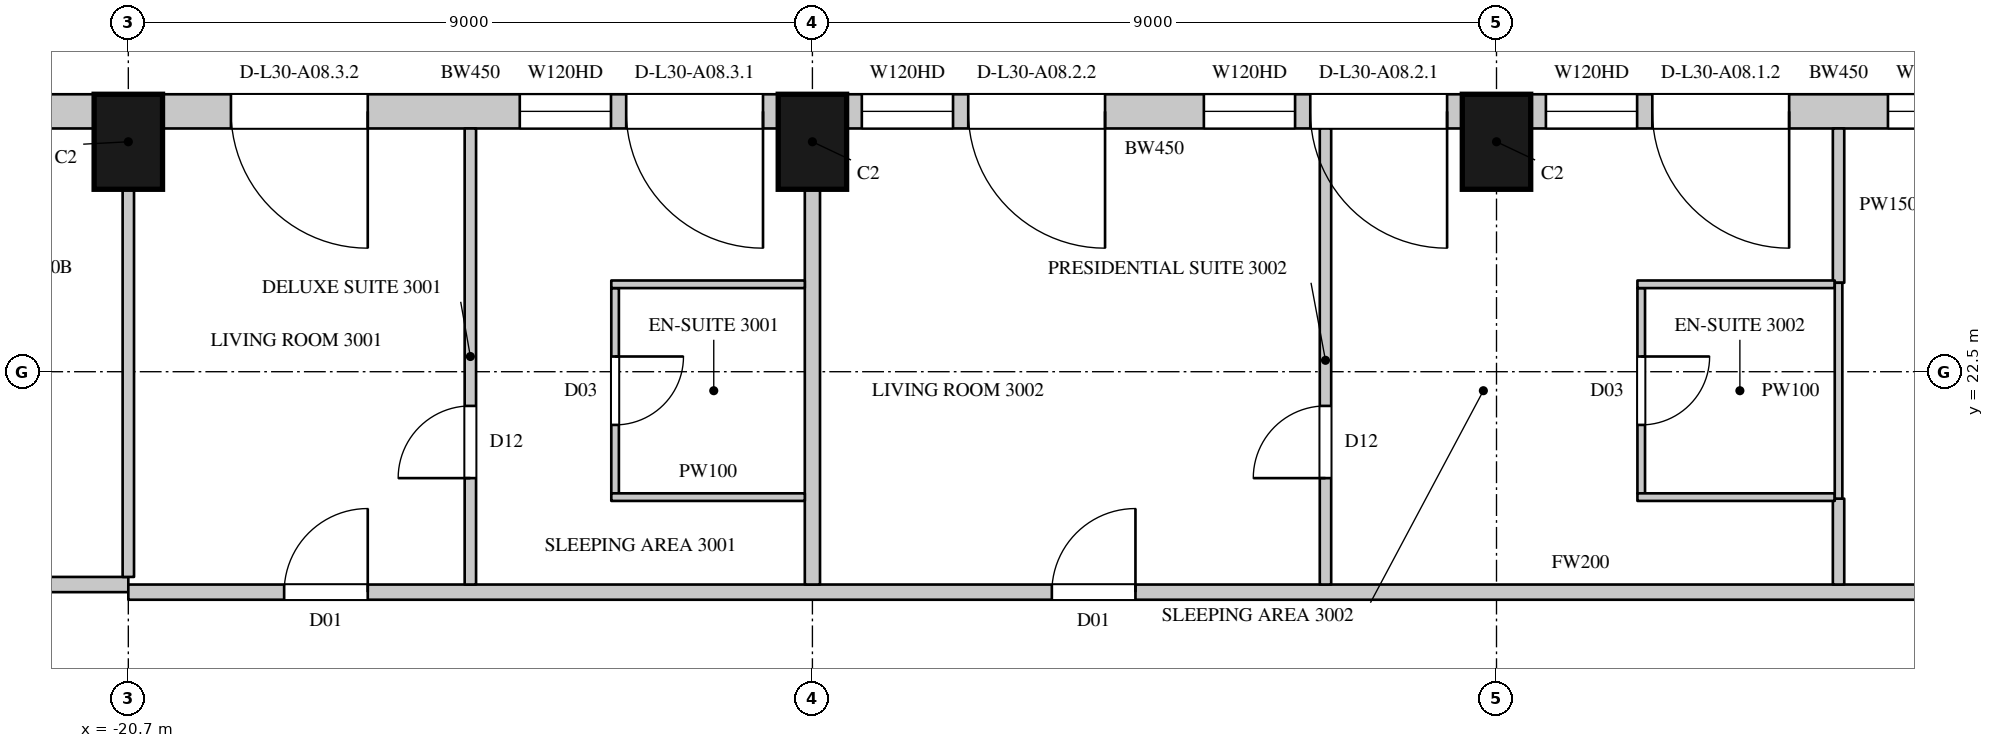
"""IFC4 building model, lengths in metres.
Left out: names, types, materials, properties, quantities, classifications, styles, units other than length and angle.
Written with IfcOpenShell. Run it as: python <this file> out.ifc"""

import sys

from ifc_helpers import new_model, si_unit, direction, frame, frame_2d, origin, origin_2d, place, context, subcontext, project, spatial, rectangle, extrude, element, fill, save


model = new_model("IFC4")
c1 = context("Model", 3, precision=1e-05, world=origin(), true_north=direction((0.0, 1.0)))
c2 = subcontext(c1, "Body", "Model", "MODEL_VIEW")
j1 = project(units=[si_unit("LENGTHUNIT", "METRE"), si_unit("PLANEANGLEUNIT", "RADIAN")], contexts=[c1])
p1 = place(None, origin())
s1 = spatial("IfcSite", under=j1, at=p1, CompositionType="ELEMENT")
p2 = place(p1, origin())
s2 = spatial("IfcBuilding", under=s1, at=p2, CompositionType="ELEMENT")
p3 = place(p2, frame((0.0, 0.0, 138.3)))
s3 = spatial("IfcBuildingStorey", under=s2, at=p3, CompositionType="ELEMENT", Elevation=138.3)
for number, where, z_axis, x_axis in (
    (1, (-2.7, 25.525, 0.0), (0.0, 0.0, 1.0), (-1.0, 0.0, 0.0)),
    (2, (-11.7, 25.525, 0.0), (0.0, 0.0, 1.0), (-1.0, 0.0, 0.0)),
    (3, (-20.7, 25.525, 0.0), (0.0, 0.0, 1.0), (-1.0, 0.0, 0.0)),
):
    element("IfcColumn", number, at=place(p3, frame(where, z_axis=z_axis, x_axis=x_axis)), inside=s3, PredefinedType="COLUMN", context=c2, shape_type="SweptSolid", body=[
        extrude(rectangle(XDim=0.9, YDim=1.25, at=origin_2d()), origin(), (0.0, 0.0, 1.0), 3.6),
    ])
p4 = place(p3, frame((5.85, 25.925, 0.0), z_axis=(0.0, 0.0, 1.0), x_axis=(-1.0, 0.0, 0.0)))
e4 = element("IfcWall", 4, at=p4, inside=s3, PredefinedType="SOLIDWALL", context=c2, shape_type="SweptSolid", body=[
    extrude(rectangle(XDim=8.1, YDim=0.45, at=frame_2d((4.05, 0.0))), origin(), (0.0, 0.0, 1.0), 3.3),
])
p5 = place(p4, frame((0.2, 0.0, 0.0)))
e5 = element("IfcOpeningElement", 5, at=p5, cuts=e4, PredefinedType="OPENING", context=c2, shape_type="SweptSolid", body=[
    extrude(rectangle(XDim=1.8, YDim=2.4, at=frame_2d((0.9, 1.2))), frame((0.0, 0.235, 0.0), z_axis=(0.0, -1.0, 0.0), x_axis=(1.0, 0.0, 0.0)), (0.0, 0.0, 1.0), 0.47),
])
p6 = place(p4, frame((2.2, 0.0, 1.05)))
e6 = element("IfcOpeningElement", 6, at=p6, cuts=e4, PredefinedType="OPENING", context=c2, shape_type="SweptSolid", body=[
    extrude(rectangle(XDim=1.2, YDim=2.0, at=frame_2d((0.6, 1.0))), frame((0.0, 0.235, 0.0), z_axis=(0.0, -1.0, 0.0), x_axis=(1.0, 0.0, 0.0)), (0.0, 0.0, 1.0), 0.47),
])
p7 = place(p4, frame((4.7, 0.0, 0.0)))
e7 = element("IfcOpeningElement", 7, at=p7, cuts=e4, PredefinedType="OPENING", context=c2, shape_type="SweptSolid", body=[
    extrude(rectangle(XDim=1.8, YDim=2.4, at=frame_2d((0.9, 1.2))), frame((0.0, 0.235, 0.0), z_axis=(0.0, -1.0, 0.0), x_axis=(1.0, 0.0, 0.0)), (0.0, 0.0, 1.0), 0.47),
])
p8 = place(p4, frame((6.7, 0.0, 1.05)))
e8 = element("IfcOpeningElement", 8, at=p8, cuts=e4, PredefinedType="OPENING", context=c2, shape_type="SweptSolid", body=[
    extrude(rectangle(XDim=1.2, YDim=2.0, at=frame_2d((0.6, 1.0))), frame((0.0, 0.235, 0.0), z_axis=(0.0, -1.0, 0.0), x_axis=(1.0, 0.0, 0.0)), (0.0, 0.0, 1.0), 0.47),
])
p9 = place(p3, frame((-3.15, 25.925, 0.0), z_axis=(0.0, 0.0, 1.0), x_axis=(-1.0, 0.0, 0.0)))
e9 = element("IfcWall", 9, at=p9, inside=s3, PredefinedType="SOLIDWALL", context=c2, shape_type="SweptSolid", body=[
    extrude(rectangle(XDim=8.1, YDim=0.45, at=frame_2d((4.05, 0.0))), origin(), (0.0, 0.0, 1.0), 3.3),
])
p10 = place(p9, frame((0.2, 0.0, 0.0)))
e10 = element("IfcOpeningElement", 10, at=p10, cuts=e9, PredefinedType="OPENING", context=c2, shape_type="SweptSolid", body=[
    extrude(rectangle(XDim=1.8, YDim=2.4, at=frame_2d((0.9, 1.2))), frame((0.0, 0.235, 0.0), z_axis=(0.0, -1.0, 0.0), x_axis=(1.0, 0.0, 0.0)), (0.0, 0.0, 1.0), 0.47),
])
p11 = place(p9, frame((2.2, 0.0, 1.05)))
e11 = element("IfcOpeningElement", 11, at=p11, cuts=e9, PredefinedType="OPENING", context=c2, shape_type="SweptSolid", body=[
    extrude(rectangle(XDim=1.2, YDim=2.0, at=frame_2d((0.6, 1.0))), frame((0.0, 0.235, 0.0), z_axis=(0.0, -1.0, 0.0), x_axis=(1.0, 0.0, 0.0)), (0.0, 0.0, 1.0), 0.47),
])
p12 = place(p9, frame((4.7, 0.0, 0.0)))
e12 = element("IfcOpeningElement", 12, at=p12, cuts=e9, PredefinedType="OPENING", context=c2, shape_type="SweptSolid", body=[
    extrude(rectangle(XDim=1.8, YDim=2.4, at=frame_2d((0.9, 1.2))), frame((0.0, 0.235, 0.0), z_axis=(0.0, -1.0, 0.0), x_axis=(1.0, 0.0, 0.0)), (0.0, 0.0, 1.0), 0.47),
])
p13 = place(p9, frame((6.7, 0.0, 1.05)))
e13 = element("IfcOpeningElement", 13, at=p13, cuts=e9, PredefinedType="OPENING", context=c2, shape_type="SweptSolid", body=[
    extrude(rectangle(XDim=1.2, YDim=2.0, at=frame_2d((0.6, 1.0))), frame((0.0, 0.235, 0.0), z_axis=(0.0, -1.0, 0.0), x_axis=(1.0, 0.0, 0.0)), (0.0, 0.0, 1.0), 0.47),
])
p14 = place(p3, frame((-12.15, 25.925, 0.0), z_axis=(0.0, 0.0, 1.0), x_axis=(-1.0, 0.0, 0.0)))
e14 = element("IfcWall", 14, at=p14, inside=s3, PredefinedType="SOLIDWALL", context=c2, shape_type="SweptSolid", body=[
    extrude(rectangle(XDim=8.1, YDim=0.45, at=frame_2d((4.05, 0.0))), origin(), (0.0, 0.0, 1.0), 3.3),
])
p15 = place(p14, frame((0.2, 0.0, 0.0)))
e15 = element("IfcOpeningElement", 15, at=p15, cuts=e14, PredefinedType="OPENING", context=c2, shape_type="SweptSolid", body=[
    extrude(rectangle(XDim=1.8, YDim=2.4, at=frame_2d((0.9, 1.2))), frame((0.0, 0.235, 0.0), z_axis=(0.0, -1.0, 0.0), x_axis=(1.0, 0.0, 0.0)), (0.0, 0.0, 1.0), 0.47),
])
p16 = place(p14, frame((2.2, 0.0, 1.05)))
e16 = element("IfcOpeningElement", 16, at=p16, cuts=e14, PredefinedType="OPENING", context=c2, shape_type="SweptSolid", body=[
    extrude(rectangle(XDim=1.2, YDim=2.0, at=frame_2d((0.6, 1.0))), frame((0.0, 0.235, 0.0), z_axis=(0.0, -1.0, 0.0), x_axis=(1.0, 0.0, 0.0)), (0.0, 0.0, 1.0), 0.47),
])
p17 = place(p14, frame((5.4, 0.0, 0.0)))
e17 = element("IfcOpeningElement", 17, at=p17, cuts=e14, PredefinedType="OPENING", context=c2, shape_type="SweptSolid", body=[
    extrude(rectangle(XDim=1.8, YDim=2.4, at=frame_2d((0.9, 1.2))), frame((0.0, 0.235, 0.0), z_axis=(0.0, -1.0, 0.0), x_axis=(1.0, 0.0, 0.0)), (0.0, 0.0, 1.0), 0.47),
])
p18 = place(p3, frame((-21.15, 25.925, 0.0), z_axis=(0.0, 0.0, 1.0), x_axis=(-1.0, 0.0, 0.0)))
e18 = element("IfcWall", 18, at=p18, inside=s3, PredefinedType="SOLIDWALL", context=c2, shape_type="SweptSolid", body=[
    extrude(rectangle(XDim=2.914, YDim=0.45, at=frame_2d((1.457, 0.0))), origin(), (0.0, 0.0, 1.0), 3.3),
])
p19 = place(p3, frame((-23.752, 19.7, 0.0), z_axis=(0.0, 0.0, 1.0), x_axis=(1.0, 0.0, 0.0)))
e19 = element("IfcWall", 19, at=p19, inside=s3, PredefinedType="PARTITIONING", context=c2, shape_type="SweptSolid", body=[
    extrude(rectangle(XDim=3.052, YDim=0.2, at=frame_2d((1.526, 0.0))), origin(), (0.0, 0.0, 1.0), 3.3),
])
p20 = place(p19, frame((0.85, 0.0, 0.0)))
e20 = element("IfcOpeningElement", 20, at=p20, cuts=e19, PredefinedType="OPENING", context=c2, shape_type="SweptSolid", body=[
    extrude(rectangle(XDim=0.9, YDim=2.2, at=frame_2d((0.45, 1.1))), frame((0.0, 0.11, 0.0), z_axis=(0.0, -1.0, 0.0), x_axis=(1.0, 0.0, 0.0)), (0.0, 0.0, 1.0), 0.22),
])
p21 = place(p3, frame((-20.7, 19.6, 0.0), z_axis=(0.0, 0.0, 1.0), x_axis=(1.0, 0.0, 0.0)))
e21 = element("IfcWall", 21, at=p21, inside=s3, PredefinedType="PARTITIONING", context=c2, shape_type="SweptSolid", body=[
    extrude(rectangle(XDim=38.214, YDim=0.2, at=frame_2d((19.107, 0.0))), origin(), (0.0, 0.0, 1.0), 3.3),
])
p22 = place(p21, frame((23.95, 0.0, 0.0)))
e22 = element("IfcOpeningElement", 22, at=p22, cuts=e21, PredefinedType="OPENING", context=c2, shape_type="SweptSolid", body=[
    extrude(rectangle(XDim=0.9, YDim=2.2, at=frame_2d((0.45, 1.1))), frame((0.0, 0.11, 0.0), z_axis=(0.0, -1.0, 0.0), x_axis=(1.0, 0.0, 0.0)), (0.0, 0.0, 1.0), 0.22),
])
p23 = place(p21, frame((2.05, 0.0, 0.0)))
e23 = element("IfcOpeningElement", 23, at=p23, cuts=e21, PredefinedType="OPENING", context=c2, shape_type="SweptSolid", body=[
    extrude(rectangle(XDim=1.1, YDim=2.4, at=frame_2d((0.55, 1.2))), frame((0.0, 0.11, 0.0), z_axis=(0.0, -1.0, 0.0), x_axis=(1.0, 0.0, 0.0)), (0.0, 0.0, 1.0), 0.22),
])
p24 = place(p21, frame((12.15, 0.0, 0.0)))
e24 = element("IfcOpeningElement", 24, at=p24, cuts=e21, PredefinedType="OPENING", context=c2, shape_type="SweptSolid", body=[
    extrude(rectangle(XDim=1.1, YDim=2.4, at=frame_2d((0.55, 1.2))), frame((0.0, 0.11, 0.0), z_axis=(0.0, -1.0, 0.0), x_axis=(1.0, 0.0, 0.0)), (0.0, 0.0, 1.0), 0.22),
])
p25 = place(p21, frame((30.2, 0.0, 0.0)))
e25 = element("IfcOpeningElement", 25, at=p25, cuts=e21, PredefinedType="OPENING", context=c2, shape_type="SweptSolid", body=[
    extrude(rectangle(XDim=0.95, YDim=2.2, at=frame_2d((0.475, 1.1))), frame((0.0, 0.11, 0.0), z_axis=(0.0, -1.0, 0.0), x_axis=(1.0, 0.0, 0.0)), (0.0, 0.0, 1.0), 0.22),
])
p26 = place(p21, frame((36.95, 0.0, 0.0)))
e26 = element("IfcOpeningElement", 26, at=p26, cuts=e21, PredefinedType="OPENING", context=c2, shape_type="SweptSolid", body=[
    extrude(rectangle(XDim=0.95, YDim=2.2, at=frame_2d((0.475, 1.1))), frame((0.0, 0.11, 0.0), z_axis=(0.0, -1.0, 0.0), x_axis=(1.0, 0.0, 0.0)), (0.0, 0.0, 1.0), 0.22),
])
p27 = place(p3, frame((-20.7, 19.8, 0.0), z_axis=(0.0, 0.0, 1.0), x_axis=(0.0, 1.0, 0.0)))
e27 = element("IfcWall", 27, at=p27, inside=s3, PredefinedType="PARTITIONING", context=c2, shape_type="SweptSolid", body=[
    extrude(rectangle(XDim=5.1, YDim=0.15, at=frame_2d((2.55, 0.0))), origin(), (0.0, 0.0, 1.0), 2.75),
])
p28 = place(p3, frame((-16.2, 19.7, 0.0), z_axis=(0.0, 0.0, 1.0), x_axis=(0.0, 1.0, 0.0)))
e28 = element("IfcWall", 28, at=p28, inside=s3, PredefinedType="PARTITIONING", context=c2, shape_type="SweptSolid", body=[
    extrude(rectangle(XDim=6.0, YDim=0.15, at=frame_2d((3.0, 0.0))), origin(), (0.0, 0.0, 1.0), 2.65),
])
p29 = place(p28, frame((1.4, 0.0, 0.0)))
e29 = element("IfcOpeningElement", 29, at=p29, cuts=e28, PredefinedType="OPENING", context=c2, shape_type="SweptSolid", body=[
    extrude(rectangle(XDim=0.95, YDim=2.2, at=frame_2d((0.475, 1.1))), frame((0.0, 0.085, 0.0), z_axis=(0.0, -1.0, 0.0), x_axis=(1.0, 0.0, 0.0)), (0.0, 0.0, 1.0), 0.17),
])
p30 = place(p3, frame((-4.95, 19.7, 0.0), z_axis=(0.0, 0.0, 1.0), x_axis=(0.0, 1.0, 0.0)))
e30 = element("IfcWall", 30, at=p30, inside=s3, PredefinedType="PARTITIONING", context=c2, shape_type="SweptSolid", body=[
    extrude(rectangle(XDim=6.0, YDim=0.15, at=frame_2d((3.0, 0.0))), origin(), (0.0, 0.0, 1.0), 3.3),
])
p31 = place(p30, frame((1.4, 0.0, 0.0)))
e31 = element("IfcOpeningElement", 31, at=p31, cuts=e30, PredefinedType="OPENING", context=c2, shape_type="SweptSolid", body=[
    extrude(rectangle(XDim=0.95, YDim=2.2, at=frame_2d((0.475, 1.1))), frame((0.0, 0.085, 0.0), z_axis=(0.0, -1.0, 0.0), x_axis=(1.0, 0.0, 0.0)), (0.0, 0.0, 1.0), 0.17),
])
p32 = place(p3, frame((1.8, 19.7, 0.0), z_axis=(0.0, 0.0, 1.0), x_axis=(0.0, 1.0, 0.0)))
e32 = element("IfcWall", 32, at=p32, inside=s3, PredefinedType="PARTITIONING", context=c2, shape_type="SweptSolid", body=[
    extrude(rectangle(XDim=1.13, YDim=0.15, at=frame_2d((0.565, 0.0))), origin(), (0.0, 0.0, 1.0), 2.65),
])
p33 = place(p3, frame((1.8, 23.67, 0.0), z_axis=(0.0, 0.0, 1.0), x_axis=(0.0, 1.0, 0.0)))
e33 = element("IfcWall", 33, at=p33, inside=s3, PredefinedType="PARTITIONING", context=c2, shape_type="SweptSolid", body=[
    extrude(rectangle(XDim=2.03, YDim=0.15, at=frame_2d((1.015, 0.0))), origin(), (0.0, 0.0, 1.0), 2.65),
])
p34 = place(p3, frame((-11.7, 19.7, 0.0), z_axis=(0.0, 0.0, 1.0), x_axis=(0.0, 1.0, 0.0)))
e34 = element("IfcWall", 34, at=p34, inside=s3, PredefinedType="PARTITIONING", context=c2, shape_type="SweptSolid", body=[
    extrude(rectangle(XDim=5.2, YDim=0.2, at=frame_2d((2.6, 0.0))), origin(), (0.0, 0.0, 1.0), 2.75),
])
p35 = place(p3, frame((-14.296, 20.9, 0.0), z_axis=(0.0, 0.0, 1.0), x_axis=(0.0, 1.0, 0.0)))
e35 = element("IfcWall", 35, at=p35, inside=s3, PredefinedType="PARTITIONING", context=c2, shape_type="SweptSolid", body=[
    extrude(rectangle(XDim=2.7, YDim=0.1, at=frame_2d((1.35, 0.0))), origin(), (0.0, 0.0, 1.0), 3.3),
])
p36 = place(p35, frame((0.9, 0.0, 0.0)))
e36 = element("IfcOpeningElement", 36, at=p36, cuts=e35, PredefinedType="OPENING", context=c2, shape_type="SweptSolid", body=[
    extrude(rectangle(XDim=0.9, YDim=2.2, at=frame_2d((0.45, 1.1))), frame((0.0, 0.06, 0.0), z_axis=(0.0, -1.0, 0.0), x_axis=(1.0, 0.0, 0.0)), (0.0, 0.0, 1.0), 0.12),
])
for number, where, z_axis, x_axis in (
    (37, (-14.346, 20.85, 0.0), (0.0, 0.0, 1.0), (1.0, 0.0, 0.0)),
    (38, (-14.346, 23.65, 0.0), (0.0, 0.0, 1.0), (1.0, 0.0, 0.0)),
):
    element("IfcWall", number, at=place(p3, frame(where, z_axis=z_axis, x_axis=x_axis)), inside=s3, PredefinedType="PARTITIONING", context=c2, shape_type="SweptSolid", body=[
        extrude(rectangle(XDim=2.546, YDim=0.1, at=frame_2d((1.273, 0.0))), origin(), (0.0, 0.0, 1.0), 3.3),
    ])
p37 = place(p3, frame((-0.796, 20.9, 0.0), z_axis=(0.0, 0.0, 1.0), x_axis=(0.0, 1.0, 0.0)))
e39 = element("IfcWall", 39, at=p37, inside=s3, PredefinedType="PARTITIONING", context=c2, shape_type="SweptSolid", body=[
    extrude(rectangle(XDim=2.7, YDim=0.1, at=frame_2d((1.35, 0.0))), origin(), (0.0, 0.0, 1.0), 3.3),
])
p38 = place(p37, frame((0.9, 0.0, 0.0)))
e40 = element("IfcOpeningElement", 40, at=p38, cuts=e39, PredefinedType="OPENING", context=c2, shape_type="SweptSolid", body=[
    extrude(rectangle(XDim=0.9, YDim=2.2, at=frame_2d((0.45, 1.1))), frame((0.0, 0.06, 0.0), z_axis=(0.0, -1.0, 0.0), x_axis=(1.0, 0.0, 0.0)), (0.0, 0.0, 1.0), 0.12),
])
for number, where, z_axis, x_axis in (
    (41, (-0.846, 20.85, 0.0), (0.0, 0.0, 1.0), (1.0, 0.0, 0.0)),
    (42, (-0.846, 23.65, 0.0), (0.0, 0.0, 1.0), (1.0, 0.0, 0.0)),
):
    element("IfcWall", number, at=place(p3, frame(where, z_axis=z_axis, x_axis=x_axis)), inside=s3, PredefinedType="PARTITIONING", context=c2, shape_type="SweptSolid", body=[
        extrude(rectangle(XDim=2.596, YDim=0.1, at=frame_2d((1.298, 0.0))), origin(), (0.0, 0.0, 1.0), 3.3),
    ])
p39 = place(p3, frame((1.8, 20.83, 0.0), z_axis=(0.0, 0.0, 1.0), x_axis=(0.0, 1.0, 0.0)))
e43 = element("IfcWall", 43, at=p39, inside=s3, PredefinedType="PARTITIONING", context=c2, shape_type="SweptSolid", body=[
    extrude(rectangle(XDim=2.84, YDim=0.1, at=frame_2d((1.42, 0.0))), origin(), (0.0, 0.0, 1.0), 2.65),
])
p40 = place(p6, origin())
e44 = element("IfcWindow", 44, at=p40, inside=s3, PartitioningType="SINGLE_PANEL", PredefinedType="WINDOW", context=c2, shape_type="SweptSolid", body=[
    extrude(rectangle(XDim=1.2, YDim=2.0, at=frame_2d((0.6, 1.0))), frame((0.0, 0.135, 0.0), z_axis=(0.0, -1.0, 0.0), x_axis=(1.0, 0.0, 0.0)), (0.0, 0.0, 1.0), 0.06),
])
fill(e6, e44)
p41 = place(p7, origin())
e45 = element("IfcDoor", 45, at=p41, inside=s3, OperationType="SLIDING_TO_LEFT", PredefinedType="DOOR", context=c2, shape_type="SweptSolid", body=[
    extrude(rectangle(XDim=1.8, YDim=2.4, at=frame_2d((0.9, 1.2))), frame((0.0, 0.13, 0.0), z_axis=(0.0, -1.0, 0.0), x_axis=(1.0, 0.0, 0.0)), (0.0, 0.0, 1.0), 0.05),
])
fill(e7, e45)
p42 = place(p8, origin())
e46 = element("IfcWindow", 46, at=p42, inside=s3, PartitioningType="SINGLE_PANEL", PredefinedType="WINDOW", context=c2, shape_type="SweptSolid", body=[
    extrude(rectangle(XDim=1.2, YDim=2.0, at=frame_2d((0.6, 1.0))), frame((0.0, 0.135, 0.0), z_axis=(0.0, -1.0, 0.0), x_axis=(1.0, 0.0, 0.0)), (0.0, 0.0, 1.0), 0.06),
])
fill(e8, e46)
p43 = place(p10, origin())
e47 = element("IfcDoor", 47, at=p43, inside=s3, OperationType="SLIDING_TO_LEFT", PredefinedType="DOOR", context=c2, shape_type="SweptSolid", body=[
    extrude(rectangle(XDim=1.8, YDim=2.4, at=frame_2d((0.9, 1.2))), frame((0.0, 0.13, 0.0), z_axis=(0.0, -1.0, 0.0), x_axis=(1.0, 0.0, 0.0)), (0.0, 0.0, 1.0), 0.05),
])
fill(e10, e47)
p44 = place(p11, origin())
e48 = element("IfcWindow", 48, at=p44, inside=s3, PartitioningType="SINGLE_PANEL", PredefinedType="WINDOW", context=c2, shape_type="SweptSolid", body=[
    extrude(rectangle(XDim=1.2, YDim=2.0, at=frame_2d((0.6, 1.0))), frame((0.0, 0.135, 0.0), z_axis=(0.0, -1.0, 0.0), x_axis=(1.0, 0.0, 0.0)), (0.0, 0.0, 1.0), 0.06),
])
fill(e11, e48)
p45 = place(p12, origin())
e49 = element("IfcDoor", 49, at=p45, inside=s3, OperationType="SLIDING_TO_LEFT", PredefinedType="DOOR", context=c2, shape_type="SweptSolid", body=[
    extrude(rectangle(XDim=1.8, YDim=2.4, at=frame_2d((0.9, 1.2))), frame((0.0, 0.13, 0.0), z_axis=(0.0, -1.0, 0.0), x_axis=(1.0, 0.0, 0.0)), (0.0, 0.0, 1.0), 0.05),
])
fill(e12, e49)
p46 = place(p13, origin())
e50 = element("IfcWindow", 50, at=p46, inside=s3, PartitioningType="SINGLE_PANEL", PredefinedType="WINDOW", context=c2, shape_type="SweptSolid", body=[
    extrude(rectangle(XDim=1.2, YDim=2.0, at=frame_2d((0.6, 1.0))), frame((0.0, 0.135, 0.0), z_axis=(0.0, -1.0, 0.0), x_axis=(1.0, 0.0, 0.0)), (0.0, 0.0, 1.0), 0.06),
])
fill(e13, e50)
p47 = place(p15, origin())
e51 = element("IfcDoor", 51, at=p47, inside=s3, OperationType="SLIDING_TO_LEFT", PredefinedType="DOOR", context=c2, shape_type="SweptSolid", body=[
    extrude(rectangle(XDim=1.8, YDim=2.4, at=frame_2d((0.9, 1.2))), frame((0.0, 0.13, 0.0), z_axis=(0.0, -1.0, 0.0), x_axis=(1.0, 0.0, 0.0)), (0.0, 0.0, 1.0), 0.05),
])
fill(e15, e51)
p48 = place(p16, origin())
e52 = element("IfcWindow", 52, at=p48, inside=s3, PartitioningType="SINGLE_PANEL", PredefinedType="WINDOW", context=c2, shape_type="SweptSolid", body=[
    extrude(rectangle(XDim=1.2, YDim=2.0, at=frame_2d((0.6, 1.0))), frame((0.0, 0.135, 0.0), z_axis=(0.0, -1.0, 0.0), x_axis=(1.0, 0.0, 0.0)), (0.0, 0.0, 1.0), 0.06),
])
fill(e16, e52)
p49 = place(p17, origin())
e53 = element("IfcDoor", 53, at=p49, inside=s3, OperationType="SLIDING_TO_LEFT", PredefinedType="DOOR", context=c2, shape_type="SweptSolid", body=[
    extrude(rectangle(XDim=1.8, YDim=2.4, at=frame_2d((0.9, 1.2))), frame((0.0, 0.13, 0.0), z_axis=(0.0, -1.0, 0.0), x_axis=(1.0, 0.0, 0.0)), (0.0, 0.0, 1.0), 0.05),
])
fill(e17, e53)
p50 = place(p23, origin())
e54 = element("IfcDoor", 54, at=p50, inside=s3, OperationType="SINGLE_SWING_RIGHT", PredefinedType="DOOR", context=c2, shape_type="SweptSolid", body=[
    extrude(rectangle(XDim=1.1, YDim=2.4, at=frame_2d((0.55, 1.2))), frame((0.0, 0.025, 0.0), z_axis=(0.0, -1.0, 0.0), x_axis=(1.0, 0.0, 0.0)), (0.0, 0.0, 1.0), 0.05),
])
fill(e23, e54)
p51 = place(p29, origin())
e55 = element("IfcDoor", 55, at=p51, inside=s3, OperationType="SINGLE_SWING_LEFT", PredefinedType="DOOR", context=c2, shape_type="SweptSolid", body=[
    extrude(rectangle(XDim=0.95, YDim=2.2, at=frame_2d((0.475, 1.1))), frame((0.0, 0.025, 0.0), z_axis=(0.0, -1.0, 0.0), x_axis=(1.0, 0.0, 0.0)), (0.0, 0.0, 1.0), 0.05),
])
fill(e29, e55)
p52 = place(p36, origin())
e56 = element("IfcDoor", 56, at=p52, inside=s3, OperationType="SINGLE_SWING_LEFT", PredefinedType="DOOR", context=c2, shape_type="SweptSolid", body=[
    extrude(rectangle(XDim=0.9, YDim=2.2, at=frame_2d((0.45, 1.1))), frame((0.0, 0.025, 0.0), z_axis=(0.0, -1.0, 0.0), x_axis=(1.0, 0.0, 0.0)), (0.0, 0.0, 1.0), 0.05),
])
fill(e36, e56)
p53 = place(p24, origin())
e57 = element("IfcDoor", 57, at=p53, inside=s3, OperationType="SINGLE_SWING_RIGHT", PredefinedType="DOOR", context=c2, shape_type="SweptSolid", body=[
    extrude(rectangle(XDim=1.1, YDim=2.4, at=frame_2d((0.55, 1.2))), frame((0.0, 0.025, 0.0), z_axis=(0.0, -1.0, 0.0), x_axis=(1.0, 0.0, 0.0)), (0.0, 0.0, 1.0), 0.05),
])
fill(e24, e57)
p54 = place(p31, origin())
e58 = element("IfcDoor", 58, at=p54, inside=s3, OperationType="SINGLE_SWING_LEFT", PredefinedType="DOOR", context=c2, shape_type="SweptSolid", body=[
    extrude(rectangle(XDim=0.95, YDim=2.2, at=frame_2d((0.475, 1.1))), frame((0.0, 0.025, 0.0), z_axis=(0.0, -1.0, 0.0), x_axis=(1.0, 0.0, 0.0)), (0.0, 0.0, 1.0), 0.05),
])
fill(e31, e58)
p55 = place(p38, origin())
e59 = element("IfcDoor", 59, at=p55, inside=s3, OperationType="SINGLE_SWING_LEFT", PredefinedType="DOOR", context=c2, shape_type="SweptSolid", body=[
    extrude(rectangle(XDim=0.9, YDim=2.2, at=frame_2d((0.45, 1.1))), frame((0.0, 0.025, 0.0), z_axis=(0.0, -1.0, 0.0), x_axis=(1.0, 0.0, 0.0)), (0.0, 0.0, 1.0), 0.05),
])
fill(e40, e59)
save(model, sys.argv[1])
